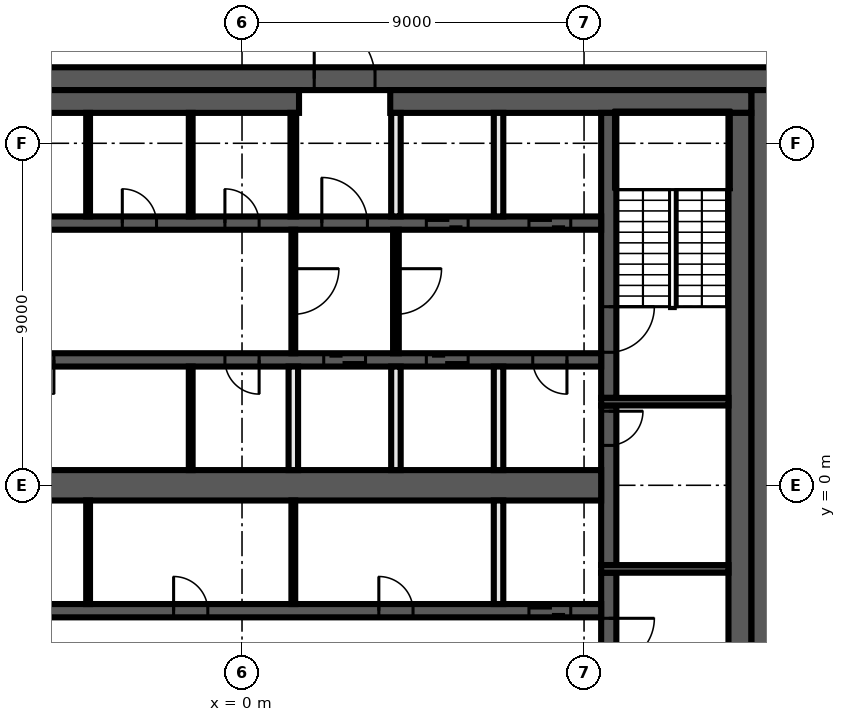
"""IFC4 building model, lengths in metres.
Left out: names, types, materials, properties, quantities, classifications, styles, units other than length and angle.
Written with IfcOpenShell. Run it as: python <this file> out.ifc"""

import sys

from ifc_helpers import new_model, si_unit, direction, frame, frame_2d, origin, place, context, subcontext, project, spatial, rectangle, extrude, element, fill, save


model = new_model("IFC4")
c1 = context("Model", 3, precision=1e-05, world=origin(), true_north=direction((0.0, 1.0)))
c2 = subcontext(c1, "Body", "Model", "MODEL_VIEW")
j1 = project(units=[si_unit("LENGTHUNIT", "METRE"), si_unit("PLANEANGLEUNIT", "RADIAN")], contexts=[c1])
p1 = place(None, origin())
s1 = spatial("IfcSite", under=j1, at=p1, CompositionType="ELEMENT")
p2 = place(p1, origin())
s2 = spatial("IfcBuilding", under=s1, at=p2, CompositionType="ELEMENT")
p3 = place(p2, frame((0.0, 0.0, 327.8)))
s3 = spatial("IfcBuildingStorey", under=s2, at=p3, CompositionType="ELEMENT", Elevation=327.8)
p4 = place(p3, frame((-14.0, 10.7, 0.0), z_axis=(0.0, 0.0, 1.0), x_axis=(1.0, 0.0, 0.0)))
e1 = element("IfcWall", 1, at=p4, inside=s3, PredefinedType="SHEAR", context=c2, shape_type="SweptSolid", body=[
    extrude(rectangle(XDim=28.0, YDim=0.6, at=frame_2d((14.0, 0.0))), origin(), (0.0, 0.0, 1.0), 3.82),
])
p5 = place(p4, frame((15.9, 0.0, 0.0)))
e2 = element("IfcOpeningElement", 2, at=p5, cuts=e1, PredefinedType="OPENING", context=c2, shape_type="SweptSolid", body=[
    extrude(rectangle(XDim=1.6, YDim=2.1, at=frame_2d((0.8, 1.05))), frame((0.0, 0.31, 0.0), z_axis=(0.0, -1.0, 0.0), x_axis=(1.0, 0.0, 0.0)), (0.0, 0.0, 1.0), 0.62),
])
p6 = place(p3, frame((13.7, 10.4, 0.0), z_axis=(0.0, 0.0, 1.0), x_axis=(0.0, -1.0, 0.0)))
e3 = element("IfcWall", 3, at=p6, inside=s3, PredefinedType="SHEAR", context=c2, shape_type="SweptSolid", body=[
    extrude(rectangle(XDim=20.8, YDim=0.6, at=frame_2d((10.4, 0.0))), origin(), (0.0, 0.0, 1.0), 3.82),
])
p7 = place(p3, frame((-13.4, 10.1, 0.0), z_axis=(0.0, 0.0, 1.0), x_axis=(1.0, 0.0, 0.0)))
e4 = element("IfcWall", 4, at=p7, inside=s3, PredefinedType="SHEAR", context=c2, shape_type="SweptSolid", body=[
    extrude(rectangle(XDim=14.9, YDim=0.6, at=frame_2d((7.45, 0.0))), origin(), (0.0, 0.0, 1.0), 3.82),
])
p8 = place(p3, frame((3.9, 10.1, 0.0), z_axis=(0.0, 0.0, 1.0), x_axis=(1.0, 0.0, 0.0)))
e5 = element("IfcWall", 5, at=p8, inside=s3, PredefinedType="SHEAR", context=c2, shape_type="SweptSolid", body=[
    extrude(rectangle(XDim=9.5, YDim=0.6, at=frame_2d((4.75, 0.0))), origin(), (0.0, 0.0, 1.0), 3.82),
])
p9 = place(p3, frame((13.1, 9.8, 0.0), z_axis=(0.0, 0.0, 1.0), x_axis=(0.0, -1.0, 0.0)))
e6 = element("IfcWall", 6, at=p9, inside=s3, PredefinedType="SHEAR", context=c2, shape_type="SweptSolid", body=[
    extrude(rectangle(XDim=19.6, YDim=0.6, at=frame_2d((9.8, 0.0))), origin(), (0.0, 0.0, 1.0), 3.82),
])
p10 = place(p3, frame((9.65, -2.3, 0.0), z_axis=(0.0, 0.0, 1.0), x_axis=(0.0, -1.0, 0.0)))
e7 = element("IfcWall", 7, at=p10, inside=s3, PredefinedType="SHEAR", context=c2, shape_type="SweptSolid", body=[
    extrude(rectangle(XDim=7.5, YDim=0.4, at=frame_2d((3.75, 0.0))), origin(), (0.0, 0.0, 1.0), 3.82),
])
p11 = place(p10, frame((1.2, 0.0, 0.0)))
e8 = element("IfcOpeningElement", 8, at=p11, cuts=e7, PredefinedType="OPENING", context=c2, shape_type="SweptSolid", body=[
    extrude(rectangle(XDim=1.2, YDim=2.1, at=frame_2d((0.6, 1.05))), frame((0.0, 0.21, 0.0), z_axis=(0.0, -1.0, 0.0), x_axis=(1.0, 0.0, 0.0)), (0.0, 0.0, 1.0), 0.42),
])
p12 = place(p3, frame((9.65, 2.1, 0.0), z_axis=(0.0, 0.0, 1.0), x_axis=(0.0, -1.0, 0.0)))
e9 = element("IfcWall", 9, at=p12, inside=s3, PredefinedType="SHEAR", context=c2, shape_type="SweptSolid", body=[
    extrude(rectangle(XDim=4.2, YDim=0.4, at=frame_2d((2.1, 0.0))), origin(), (0.0, 0.0, 1.0), 3.82),
])
p13 = place(p12, frame((0.15, 0.0, 0.0)))
e10 = element("IfcOpeningElement", 10, at=p13, cuts=e9, PredefinedType="OPENING", context=c2, shape_type="SweptSolid", body=[
    extrude(rectangle(XDim=0.9, YDim=2.1, at=frame_2d((0.45, 1.05))), frame((0.0, 0.21, 0.0), z_axis=(0.0, -1.0, 0.0), x_axis=(1.0, 0.0, 0.0)), (0.0, 0.0, 1.0), 0.42),
])
p14 = place(p3, frame((9.65, 9.8, 0.0), z_axis=(0.0, 0.0, 1.0), x_axis=(0.0, -1.0, 0.0)))
e11 = element("IfcWall", 11, at=p14, inside=s3, PredefinedType="SHEAR", context=c2, shape_type="SweptSolid", body=[
    extrude(rectangle(XDim=7.5, YDim=0.4, at=frame_2d((3.75, 0.0))), origin(), (0.0, 0.0, 1.0), 3.82),
])
p15 = place(p14, frame((5.1, 0.0, 0.0)))
e12 = element("IfcOpeningElement", 12, at=p15, cuts=e11, PredefinedType="OPENING", context=c2, shape_type="SweptSolid", body=[
    extrude(rectangle(XDim=1.2, YDim=2.1, at=frame_2d((0.6, 1.05))), frame((0.0, 0.21, 0.0), z_axis=(0.0, -1.0, 0.0), x_axis=(1.0, 0.0, 0.0)), (0.0, 0.0, 1.0), 0.42),
])
for number, where, z_axis, x_axis in (
    (13, (9.45, 2.2, 0.0), (0.0, 0.0, 1.0), (1.0, 0.0, 0.0)),
    (14, (9.45, -2.2, 0.0), (0.0, 0.0, 1.0), (1.0, 0.0, 0.0)),
):
    element("IfcWall", number, at=place(p3, frame(where, z_axis=z_axis, x_axis=x_axis)), inside=s3, PredefinedType="SHEAR", context=c2, shape_type="SweptSolid", body=[
        extrude(rectangle(XDim=3.35, YDim=0.2, at=frame_2d((1.675, 0.0))), origin(), (0.0, 0.0, 1.0), 3.82),
    ])
p16 = place(p3, frame((-9.45, 6.9, 0.0), z_axis=(0.0, 0.0, 1.0), x_axis=(1.0, 0.0, 0.0)))
e15 = element("IfcWall", 15, at=p16, inside=s3, PredefinedType="SHEAR", context=c2, shape_type="SweptSolid", body=[
    extrude(rectangle(XDim=18.9, YDim=0.35, at=frame_2d((9.45, 0.0))), origin(), (0.0, 0.0, 1.0), 3.82),
])
p17 = place(p16, frame((11.55, 0.0, 0.0)))
e16 = element("IfcOpeningElement", 16, at=p17, cuts=e15, PredefinedType="OPENING", context=c2, shape_type="SweptSolid", body=[
    extrude(rectangle(XDim=1.2, YDim=2.1, at=frame_2d((0.6, 1.05))), frame((0.0, 0.185, 0.0), z_axis=(0.0, -1.0, 0.0), x_axis=(1.0, 0.0, 0.0)), (0.0, 0.0, 1.0), 0.37),
])
p18 = place(p16, frame((14.3, 0.0, 0.0)))
e17 = element("IfcOpeningElement", 17, at=p18, cuts=e15, PredefinedType="OPENING", context=c2, shape_type="SweptSolid", body=[
    extrude(rectangle(XDim=1.1, YDim=2.1, at=frame_2d((0.55, 1.05))), frame((0.0, 0.185, 0.0), z_axis=(0.0, -1.0, 0.0), x_axis=(1.0, 0.0, 0.0)), (0.0, 0.0, 1.0), 0.37),
])
p19 = place(p16, frame((17.0, 0.0, 0.0)))
e18 = element("IfcOpeningElement", 18, at=p19, cuts=e15, PredefinedType="OPENING", context=c2, shape_type="SweptSolid", body=[
    extrude(rectangle(XDim=1.1, YDim=2.1, at=frame_2d((0.55, 1.05))), frame((0.0, 0.185, 0.0), z_axis=(0.0, -1.0, 0.0), x_axis=(1.0, 0.0, 0.0)), (0.0, 0.0, 1.0), 0.37),
])
p20 = place(p16, frame((2.25, 0.0, 0.0)))
e19 = element("IfcOpeningElement", 19, at=p20, cuts=e15, PredefinedType="OPENING", context=c2, shape_type="SweptSolid", body=[
    extrude(rectangle(XDim=0.9, YDim=2.1, at=frame_2d((0.45, 1.05))), frame((0.0, 0.185, 0.0), z_axis=(0.0, -1.0, 0.0), x_axis=(1.0, 0.0, 0.0)), (0.0, 0.0, 1.0), 0.37),
])
p21 = place(p16, frame((6.3, 0.0, 0.0)))
e20 = element("IfcOpeningElement", 20, at=p21, cuts=e15, PredefinedType="OPENING", context=c2, shape_type="SweptSolid", body=[
    extrude(rectangle(XDim=0.9, YDim=2.1, at=frame_2d((0.45, 1.05))), frame((0.0, 0.185, 0.0), z_axis=(0.0, -1.0, 0.0), x_axis=(1.0, 0.0, 0.0)), (0.0, 0.0, 1.0), 0.37),
])
p22 = place(p16, frame((9.0, 0.0, 0.0)))
e21 = element("IfcOpeningElement", 21, at=p22, cuts=e15, PredefinedType="OPENING", context=c2, shape_type="SweptSolid", body=[
    extrude(rectangle(XDim=0.9, YDim=2.1, at=frame_2d((0.45, 1.05))), frame((0.0, 0.185, 0.0), z_axis=(0.0, -1.0, 0.0), x_axis=(1.0, 0.0, 0.0)), (0.0, 0.0, 1.0), 0.37),
])
p23 = place(p3, frame((9.45, 3.3, 0.0), z_axis=(0.0, 0.0, 1.0), x_axis=(-1.0, 0.0, 0.0)))
e22 = element("IfcWall", 22, at=p23, inside=s3, PredefinedType="SHEAR", context=c2, shape_type="SweptSolid", body=[
    extrude(rectangle(XDim=18.9, YDim=0.35, at=frame_2d((9.45, 0.0))), origin(), (0.0, 0.0, 1.0), 3.82),
])
p24 = place(p23, frame((6.2, 0.0, 0.0)))
e23 = element("IfcOpeningElement", 23, at=p24, cuts=e22, PredefinedType="OPENING", context=c2, shape_type="SweptSolid", body=[
    extrude(rectangle(XDim=1.1, YDim=2.1, at=frame_2d((0.55, 1.05))), frame((0.0, 0.185, 0.0), z_axis=(0.0, -1.0, 0.0), x_axis=(1.0, 0.0, 0.0)), (0.0, 0.0, 1.0), 0.37),
])
p25 = place(p23, frame((3.5, 0.0, 0.0)))
e24 = element("IfcOpeningElement", 24, at=p25, cuts=e22, PredefinedType="OPENING", context=c2, shape_type="SweptSolid", body=[
    extrude(rectangle(XDim=1.1, YDim=2.1, at=frame_2d((0.55, 1.05))), frame((0.0, 0.185, 0.0), z_axis=(0.0, -1.0, 0.0), x_axis=(1.0, 0.0, 0.0)), (0.0, 0.0, 1.0), 0.37),
])
p26 = place(p23, frame((0.9, 0.0, 0.0)))
e25 = element("IfcOpeningElement", 25, at=p26, cuts=e22, PredefinedType="OPENING", context=c2, shape_type="SweptSolid", body=[
    extrude(rectangle(XDim=0.9, YDim=2.1, at=frame_2d((0.45, 1.05))), frame((0.0, 0.185, 0.0), z_axis=(0.0, -1.0, 0.0), x_axis=(1.0, 0.0, 0.0)), (0.0, 0.0, 1.0), 0.37),
])
p27 = place(p23, frame((14.4, 0.0, 0.0)))
e26 = element("IfcOpeningElement", 26, at=p27, cuts=e22, PredefinedType="OPENING", context=c2, shape_type="SweptSolid", body=[
    extrude(rectangle(XDim=0.9, YDim=2.1, at=frame_2d((0.45, 1.05))), frame((0.0, 0.185, 0.0), z_axis=(0.0, -1.0, 0.0), x_axis=(1.0, 0.0, 0.0)), (0.0, 0.0, 1.0), 0.37),
])
p28 = place(p23, frame((9.0, 0.0, 0.0)))
e27 = element("IfcOpeningElement", 27, at=p28, cuts=e22, PredefinedType="OPENING", context=c2, shape_type="SweptSolid", body=[
    extrude(rectangle(XDim=0.9, YDim=2.1, at=frame_2d((0.45, 1.05))), frame((0.0, 0.185, 0.0), z_axis=(0.0, -1.0, 0.0), x_axis=(1.0, 0.0, 0.0)), (0.0, 0.0, 1.0), 0.37),
])
p29 = place(p3, frame((-9.45, -3.3, 0.0), z_axis=(0.0, 0.0, 1.0), x_axis=(1.0, 0.0, 0.0)))
e28 = element("IfcWall", 28, at=p29, inside=s3, PredefinedType="SHEAR", context=c2, shape_type="SweptSolid", body=[
    extrude(rectangle(XDim=18.9, YDim=0.35, at=frame_2d((9.45, 0.0))), origin(), (0.0, 0.0, 1.0), 3.82),
])
p30 = place(p29, frame((17.0, 0.0, 0.0)))
e29 = element("IfcOpeningElement", 29, at=p30, cuts=e28, PredefinedType="OPENING", context=c2, shape_type="SweptSolid", body=[
    extrude(rectangle(XDim=1.1, YDim=2.1, at=frame_2d((0.55, 1.05))), frame((0.0, 0.185, 0.0), z_axis=(0.0, -1.0, 0.0), x_axis=(1.0, 0.0, 0.0)), (0.0, 0.0, 1.0), 0.37),
])
p31 = place(p29, frame((2.25, 0.0, 0.0)))
e30 = element("IfcOpeningElement", 30, at=p31, cuts=e28, PredefinedType="OPENING", context=c2, shape_type="SweptSolid", body=[
    extrude(rectangle(XDim=0.9, YDim=2.1, at=frame_2d((0.45, 1.05))), frame((0.0, 0.185, 0.0), z_axis=(0.0, -1.0, 0.0), x_axis=(1.0, 0.0, 0.0)), (0.0, 0.0, 1.0), 0.37),
])
p32 = place(p29, frame((7.65, 0.0, 0.0)))
e31 = element("IfcOpeningElement", 31, at=p32, cuts=e28, PredefinedType="OPENING", context=c2, shape_type="SweptSolid", body=[
    extrude(rectangle(XDim=0.9, YDim=2.1, at=frame_2d((0.45, 1.05))), frame((0.0, 0.185, 0.0), z_axis=(0.0, -1.0, 0.0), x_axis=(1.0, 0.0, 0.0)), (0.0, 0.0, 1.0), 0.37),
])
p33 = place(p29, frame((13.05, 0.0, 0.0)))
e32 = element("IfcOpeningElement", 32, at=p33, cuts=e28, PredefinedType="OPENING", context=c2, shape_type="SweptSolid", body=[
    extrude(rectangle(XDim=0.9, YDim=2.1, at=frame_2d((0.45, 1.05))), frame((0.0, 0.185, 0.0), z_axis=(0.0, -1.0, 0.0), x_axis=(1.0, 0.0, 0.0)), (0.0, 0.0, 1.0), 0.37),
])
p34 = place(p3, frame((-9.45, 0.0, 0.0), z_axis=(0.0, 0.0, 1.0), x_axis=(1.0, 0.0, 0.0)))
e33 = element("IfcWall", 33, at=p34, inside=s3, PredefinedType="SHEAR", context=c2, shape_type="SweptSolid", body=[
    extrude(rectangle(XDim=18.9, YDim=0.8, at=frame_2d((9.45, 0.0))), origin(), (0.0, 0.0, 1.0), 3.82),
])
for number, where, z_axis, x_axis in (
    (34, (6.75, -3.125, 0.0), (0.0, 0.0, 1.0), (0.0, 1.0, 0.0)),
    (35, (6.75, 0.4, 0.0), (0.0, 0.0, 1.0), (0.0, 1.0, 0.0)),
    (36, (6.75, 7.075, 0.0), (0.0, 0.0, 1.0), (0.0, 1.0, 0.0)),
):
    element("IfcWall", number, at=place(p3, frame(where, z_axis=z_axis, x_axis=x_axis)), inside=s3, PredefinedType="SOLIDWALL", context=c2, shape_type="SweptSolid", body=[
        extrude(rectangle(XDim=2.725, YDim=0.25, at=frame_2d((1.363, 0.0))), origin(), (0.0, 0.0, 1.0), 3.82),
    ])
p35 = place(p3, frame((4.05, 6.725, 0.0), z_axis=(0.0, 0.0, 1.0), x_axis=(0.0, -1.0, 0.0)))
e37 = element("IfcWall", 37, at=p35, inside=s3, PredefinedType="PARTITIONING", context=c2, shape_type="SweptSolid", body=[
    extrude(rectangle(XDim=3.25, YDim=0.15, at=frame_2d((1.625, 0.0))), origin(), (0.0, 0.0, 1.0), 3.82),
])
p36 = place(p35, frame((1.025, 0.0, 0.0)))
e38 = element("IfcOpeningElement", 38, at=p36, cuts=e37, PredefinedType="OPENING", context=c2, shape_type="SweptSolid", body=[
    extrude(rectangle(XDim=1.2, YDim=2.1, at=frame_2d((0.6, 1.05))), frame((0.0, 0.085, 0.0), z_axis=(0.0, -1.0, 0.0), x_axis=(1.0, 0.0, 0.0)), (0.0, 0.0, 1.0), 0.17),
])
for number, where, z_axis, x_axis in (
    (39, (4.05, 0.4, 0.0), (0.0, 0.0, 1.0), (0.0, 1.0, 0.0)),
    (40, (4.05, 7.075, 0.0), (0.0, 0.0, 1.0), (0.0, 1.0, 0.0)),
):
    element("IfcWall", number, at=place(p3, frame(where, z_axis=z_axis, x_axis=x_axis)), inside=s3, PredefinedType="SOLIDWALL", context=c2, shape_type="SweptSolid", body=[
        extrude(rectangle(XDim=2.725, YDim=0.25, at=frame_2d((1.363, 0.0))), origin(), (0.0, 0.0, 1.0), 3.82),
    ])
p37 = place(p3, frame((1.35, 7.075, 0.0), z_axis=(0.0, 0.0, 1.0), x_axis=(0.0, 1.0, 0.0)))
e41 = element("IfcWall", 41, at=p37, inside=s3, PredefinedType="PARTITIONING", context=c2, shape_type="SweptSolid", body=[
    extrude(rectangle(XDim=2.725, YDim=0.15, at=frame_2d((1.363, 0.0))), origin(), (0.0, 0.0, 1.0), 3.82),
])
p38 = place(p3, frame((1.35, -3.125, 0.0), z_axis=(0.0, 0.0, 1.0), x_axis=(0.0, 1.0, 0.0)))
e42 = element("IfcWall", 42, at=p38, inside=s3, PredefinedType="PARTITIONING", context=c2, shape_type="SweptSolid", body=[
    extrude(rectangle(XDim=2.725, YDim=0.1, at=frame_2d((1.363, 0.0))), origin(), (0.0, 0.0, 1.0), 3.82),
])
p39 = place(p3, frame((1.35, 6.725, 0.0), z_axis=(0.0, 0.0, 1.0), x_axis=(0.0, -1.0, 0.0)))
e43 = element("IfcWall", 43, at=p39, inside=s3, PredefinedType="PARTITIONING", context=c2, shape_type="SweptSolid", body=[
    extrude(rectangle(XDim=3.25, YDim=0.1, at=frame_2d((1.625, 0.0))), origin(), (0.0, 0.0, 1.0), 3.82),
])
p40 = place(p39, frame((1.025, 0.0, 0.0)))
e44 = element("IfcOpeningElement", 44, at=p40, cuts=e43, PredefinedType="OPENING", context=c2, shape_type="SweptSolid", body=[
    extrude(rectangle(XDim=1.2, YDim=2.1, at=frame_2d((0.6, 1.05))), frame((0.0, 0.06, 0.0), z_axis=(0.0, -1.0, 0.0), x_axis=(1.0, 0.0, 0.0)), (0.0, 0.0, 1.0), 0.12),
])
p41 = place(p3, frame((1.35, 0.4, 0.0), z_axis=(0.0, 0.0, 1.0), x_axis=(0.0, 1.0, 0.0)))
e45 = element("IfcWall", 45, at=p41, inside=s3, PredefinedType="SOLIDWALL", context=c2, shape_type="SweptSolid", body=[
    extrude(rectangle(XDim=2.725, YDim=0.25, at=frame_2d((1.363, 0.0))), origin(), (0.0, 0.0, 1.0), 3.82),
])
for number, where, z_axis, x_axis in (
    (46, (-1.35, 0.4, 0.0), (0.0, 0.0, 1.0), (0.0, 1.0, 0.0)),
    (47, (-1.35, 7.075, 0.0), (0.0, 0.0, 1.0), (0.0, 1.0, 0.0)),
    (48, (-4.05, -3.125, 0.0), (0.0, 0.0, 1.0), (0.0, 1.0, 0.0)),
    (49, (-4.05, 7.075, 0.0), (0.0, 0.0, 1.0), (0.0, 1.0, 0.0)),
):
    element("IfcWall", number, at=place(p3, frame(where, z_axis=z_axis, x_axis=x_axis)), inside=s3, PredefinedType="PARTITIONING", context=c2, shape_type="SweptSolid", body=[
        extrude(rectangle(XDim=2.725, YDim=0.1, at=frame_2d((1.363, 0.0))), origin(), (0.0, 0.0, 1.0), 3.82),
    ])
p42 = place(p13, origin())
e50 = element("IfcDoor", 50, at=p42, inside=s3, OperationType="SINGLE_SWING_RIGHT", PredefinedType="DOOR", context=c2, shape_type="SweptSolid", body=[
    extrude(rectangle(XDim=0.9, YDim=2.1, at=frame_2d((0.45, 1.05))), frame((0.0, 0.025, 0.0), z_axis=(0.0, -1.0, 0.0), x_axis=(1.0, 0.0, 0.0)), (0.0, 0.0, 1.0), 0.05),
])
fill(e10, e50)
p43 = place(p5, origin())
e51 = element("IfcDoor", 51, at=p43, inside=s3, OperationType="DOUBLE_DOOR_SINGLE_SWING", PredefinedType="DOOR", context=c2, shape_type="SweptSolid", body=[
    extrude(rectangle(XDim=1.6, YDim=2.1, at=frame_2d((0.8, 1.05))), frame((0.0, 0.025, 0.0), z_axis=(0.0, -1.0, 0.0), x_axis=(1.0, 0.0, 0.0)), (0.0, 0.0, 1.0), 0.05),
])
fill(e2, e51)
p44 = place(p17, origin())
e52 = element("IfcDoor", 52, at=p44, inside=s3, OperationType="SINGLE_SWING_LEFT", PredefinedType="DOOR", context=c2, shape_type="SweptSolid", body=[
    extrude(rectangle(XDim=1.2, YDim=2.1, at=frame_2d((0.6, 1.05))), frame((0.0, 0.025, 0.0), z_axis=(0.0, -1.0, 0.0), x_axis=(1.0, 0.0, 0.0)), (0.0, 0.0, 1.0), 0.05),
])
fill(e16, e52)
p45 = place(p18, origin())
e53 = element("IfcDoor", 53, at=p45, inside=s3, OperationType="DOUBLE_DOOR_SLIDING", PredefinedType="DOOR", context=c2, shape_type="SweptSolid", body=[
    extrude(rectangle(XDim=1.1, YDim=2.1, at=frame_2d((0.55, 1.05))), frame((0.0, 0.025, 0.0), z_axis=(0.0, -1.0, 0.0), x_axis=(1.0, 0.0, 0.0)), (0.0, 0.0, 1.0), 0.05),
])
fill(e17, e53)
p46 = place(p19, origin())
e54 = element("IfcDoor", 54, at=p46, inside=s3, OperationType="DOUBLE_DOOR_SLIDING", PredefinedType="DOOR", context=c2, shape_type="SweptSolid", body=[
    extrude(rectangle(XDim=1.1, YDim=2.1, at=frame_2d((0.55, 1.05))), frame((0.0, 0.025, 0.0), z_axis=(0.0, -1.0, 0.0), x_axis=(1.0, 0.0, 0.0)), (0.0, 0.0, 1.0), 0.05),
])
fill(e18, e54)
p47 = place(p24, origin())
e55 = element("IfcDoor", 55, at=p47, inside=s3, OperationType="DOUBLE_DOOR_SLIDING", PredefinedType="DOOR", context=c2, shape_type="SweptSolid", body=[
    extrude(rectangle(XDim=1.1, YDim=2.1, at=frame_2d((0.55, 1.05))), frame((0.0, 0.025, 0.0), z_axis=(0.0, -1.0, 0.0), x_axis=(1.0, 0.0, 0.0)), (0.0, 0.0, 1.0), 0.05),
])
fill(e23, e55)
p48 = place(p25, origin())
e56 = element("IfcDoor", 56, at=p48, inside=s3, OperationType="DOUBLE_DOOR_SLIDING", PredefinedType="DOOR", context=c2, shape_type="SweptSolid", body=[
    extrude(rectangle(XDim=1.1, YDim=2.1, at=frame_2d((0.55, 1.05))), frame((0.0, 0.025, 0.0), z_axis=(0.0, -1.0, 0.0), x_axis=(1.0, 0.0, 0.0)), (0.0, 0.0, 1.0), 0.05),
])
fill(e24, e56)
p49 = place(p26, origin())
e57 = element("IfcDoor", 57, at=p49, inside=s3, OperationType="SINGLE_SWING_LEFT", PredefinedType="DOOR", context=c2, shape_type="SweptSolid", body=[
    extrude(rectangle(XDim=0.9, YDim=2.1, at=frame_2d((0.45, 1.05))), frame((0.0, 0.025, 0.0), z_axis=(0.0, -1.0, 0.0), x_axis=(1.0, 0.0, 0.0)), (0.0, 0.0, 1.0), 0.05),
])
fill(e25, e57)
p50 = place(p30, origin())
e58 = element("IfcDoor", 58, at=p50, inside=s3, OperationType="DOUBLE_DOOR_SLIDING", PredefinedType="DOOR", context=c2, shape_type="SweptSolid", body=[
    extrude(rectangle(XDim=1.1, YDim=2.1, at=frame_2d((0.55, 1.05))), frame((0.0, 0.025, 0.0), z_axis=(0.0, -1.0, 0.0), x_axis=(1.0, 0.0, 0.0)), (0.0, 0.0, 1.0), 0.05),
])
fill(e29, e58)
p51 = place(p21, origin())
e59 = element("IfcDoor", 59, at=p51, inside=s3, OperationType="SINGLE_SWING_LEFT", PredefinedType="DOOR", context=c2, shape_type="SweptSolid", body=[
    extrude(rectangle(XDim=0.9, YDim=2.1, at=frame_2d((0.45, 1.05))), frame((0.0, 0.025, 0.0), z_axis=(0.0, -1.0, 0.0), x_axis=(1.0, 0.0, 0.0)), (0.0, 0.0, 1.0), 0.05),
])
fill(e20, e59)
p52 = place(p22, origin())
e60 = element("IfcDoor", 60, at=p52, inside=s3, OperationType="SINGLE_SWING_RIGHT", PredefinedType="DOOR", context=c2, shape_type="SweptSolid", body=[
    extrude(rectangle(XDim=0.9, YDim=2.1, at=frame_2d((0.45, 1.05))), frame((0.0, 0.025, 0.0), z_axis=(0.0, -1.0, 0.0), x_axis=(1.0, 0.0, 0.0)), (0.0, 0.0, 1.0), 0.05),
])
fill(e21, e60)
p53 = place(p27, origin())
e61 = element("IfcDoor", 61, at=p53, inside=s3, OperationType="SINGLE_SWING_LEFT", PredefinedType="DOOR", context=c2, shape_type="SweptSolid", body=[
    extrude(rectangle(XDim=0.9, YDim=2.1, at=frame_2d((0.45, 1.05))), frame((0.0, 0.025, 0.0), z_axis=(0.0, -1.0, 0.0), x_axis=(1.0, 0.0, 0.0)), (0.0, 0.0, 1.0), 0.05),
])
fill(e26, e61)
p54 = place(p28, origin())
e62 = element("IfcDoor", 62, at=p54, inside=s3, OperationType="SINGLE_SWING_RIGHT", PredefinedType="DOOR", context=c2, shape_type="SweptSolid", body=[
    extrude(rectangle(XDim=0.9, YDim=2.1, at=frame_2d((0.45, 1.05))), frame((0.0, 0.025, 0.0), z_axis=(0.0, -1.0, 0.0), x_axis=(1.0, 0.0, 0.0)), (0.0, 0.0, 1.0), 0.05),
])
fill(e27, e62)
p55 = place(p32, origin())
e63 = element("IfcDoor", 63, at=p55, inside=s3, OperationType="SINGLE_SWING_RIGHT", PredefinedType="DOOR", context=c2, shape_type="SweptSolid", body=[
    extrude(rectangle(XDim=0.9, YDim=2.1, at=frame_2d((0.45, 1.05))), frame((0.0, 0.025, 0.0), z_axis=(0.0, -1.0, 0.0), x_axis=(1.0, 0.0, 0.0)), (0.0, 0.0, 1.0), 0.05),
])
fill(e31, e63)
p56 = place(p33, origin())
e64 = element("IfcDoor", 64, at=p56, inside=s3, OperationType="SINGLE_SWING_LEFT", PredefinedType="DOOR", context=c2, shape_type="SweptSolid", body=[
    extrude(rectangle(XDim=0.9, YDim=2.1, at=frame_2d((0.45, 1.05))), frame((0.0, 0.025, 0.0), z_axis=(0.0, -1.0, 0.0), x_axis=(1.0, 0.0, 0.0)), (0.0, 0.0, 1.0), 0.05),
])
fill(e32, e64)
p57 = place(p15, origin())
e65 = element("IfcDoor", 65, at=p57, inside=s3, OperationType="SINGLE_SWING_LEFT", PredefinedType="DOOR", context=c2, shape_type="SweptSolid", body=[
    extrude(rectangle(XDim=1.2, YDim=2.1, at=frame_2d((0.6, 1.05))), frame((0.0, 0.025, 0.0), z_axis=(0.0, -1.0, 0.0), x_axis=(1.0, 0.0, 0.0)), (0.0, 0.0, 1.0), 0.05),
])
fill(e12, e65)
p58 = place(p11, origin())
e66 = element("IfcDoor", 66, at=p58, inside=s3, OperationType="SINGLE_SWING_RIGHT", PredefinedType="DOOR", context=c2, shape_type="SweptSolid", body=[
    extrude(rectangle(XDim=1.2, YDim=2.1, at=frame_2d((0.6, 1.05))), frame((0.0, 0.025, 0.0), z_axis=(0.0, -1.0, 0.0), x_axis=(1.0, 0.0, 0.0)), (0.0, 0.0, 1.0), 0.05),
])
fill(e8, e66)
p59 = place(p40, origin())
e67 = element("IfcDoor", 67, at=p59, inside=s3, OperationType="SINGLE_SWING_LEFT", PredefinedType="DOOR", context=c2, shape_type="SweptSolid", body=[
    extrude(rectangle(XDim=1.2, YDim=2.1, at=frame_2d((0.6, 1.05))), frame((0.0, 0.025, 0.0), z_axis=(0.0, -1.0, 0.0), x_axis=(1.0, 0.0, 0.0)), (0.0, 0.0, 1.0), 0.05),
])
fill(e44, e67)
p60 = place(p36, origin())
e68 = element("IfcDoor", 68, at=p60, inside=s3, OperationType="SINGLE_SWING_RIGHT", PredefinedType="DOOR", context=c2, shape_type="SweptSolid", body=[
    extrude(rectangle(XDim=1.2, YDim=2.1, at=frame_2d((0.6, 1.05))), frame((0.0, 0.025, 0.0), z_axis=(0.0, -1.0, 0.0), x_axis=(1.0, 0.0, 0.0)), (0.0, 0.0, 1.0), 0.05),
])
fill(e38, e68)
save(model, sys.argv[1])
